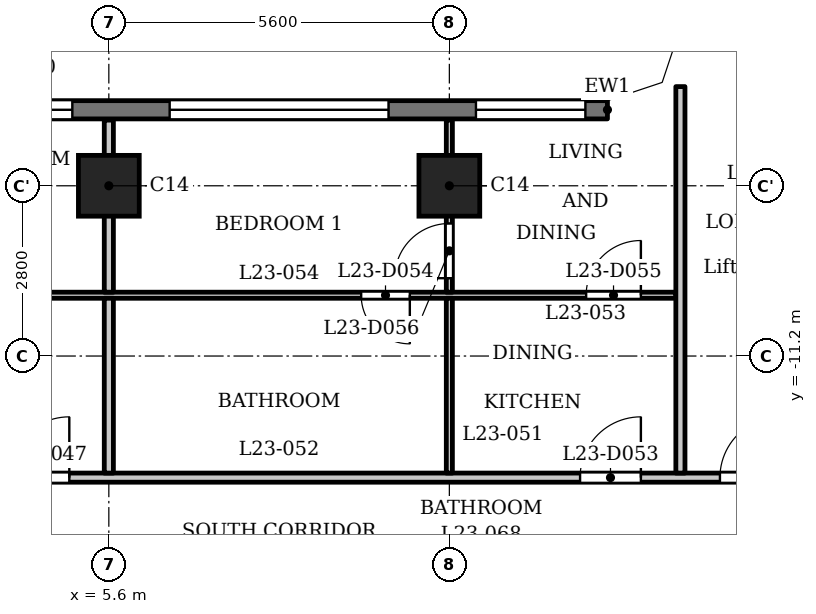
"""IFC4 building model, lengths in metres.
Left out: names, types, materials, properties, quantities, classifications, styles, units other than length and angle.
Written with IfcOpenShell. Run it as: python <this file> out.ifc"""

import sys

from ifc_helpers import new_model, si_unit, direction, frame, frame_2d, origin, origin_2d, place, context, subcontext, project, spatial, polyline, rectangle, outline, extrude, element, fill, save


model = new_model("IFC4")
c1 = context("Model", 3, precision=1e-05, world=origin(), true_north=direction((0.0, 1.0)))
c2 = subcontext(c1, "Body", "Model", "MODEL_VIEW")
j1 = project(units=[si_unit("LENGTHUNIT", "METRE"), si_unit("PLANEANGLEUNIT", "RADIAN")], contexts=[c1])
p1 = place(None, origin())
s1 = spatial("IfcSite", under=j1, at=p1, CompositionType="ELEMENT")
p2 = place(p1, origin())
s2 = spatial("IfcBuilding", under=s1, at=p2, CompositionType="ELEMENT")
p3 = place(p2, frame((0.0, 0.0, 93.8)))
s3 = spatial("IfcBuildingStorey", under=s2, at=p3, CompositionType="ELEMENT", Elevation=93.8)
for number, where, z_axis, x_axis in (
    (1, (5.6, -8.4, 0.0), (0.0, 0.0, 1.0), (1.0, 0.0, 0.0)),
    (2, (11.2, -8.4, 0.0), (0.0, 0.0, 1.0), (1.0, 0.0, 0.0)),
):
    element("IfcColumn", number, at=place(p3, frame(where, z_axis=z_axis, x_axis=x_axis)), inside=s3, PredefinedType="COLUMN", context=c2, shape_type="SweptSolid", body=[
        extrude(rectangle(XDim=1.0, YDim=1.0, at=origin_2d()), origin(), (0.0, 0.0, 1.0), 3.5),
    ])
p4 = place(p3, frame((13.8, -7.15, 0.0), z_axis=(0.0, 0.0, 1.0), x_axis=(-1.0, 0.0, 0.0)))
e3 = element("IfcWall", 3, at=p4, inside=s3, PredefinedType="SOLIDWALL", context=c2, shape_type="SweptSolid", body=[
    extrude(rectangle(XDim=27.6, YDim=0.3, at=frame_2d((13.8, 0.0))), origin(), (0.0, 0.0, 1.0), 3.2),
])
p5 = place(p4, frame((0.363, 0.0, 0.9)))
e4 = element("IfcOpeningElement", 4, at=p5, cuts=e3, PredefinedType="OPENING", context=c2, shape_type="SweptSolid", body=[
    extrude(rectangle(XDim=1.8, YDim=1.25, at=frame_2d((0.9, 0.625))), frame((0.0, 0.16, 0.0), z_axis=(0.0, -1.0, 0.0), x_axis=(1.0, 0.0, 0.0)), (0.0, 0.0, 1.0), 0.32),
])
p6 = place(p4, frame((3.6, 0.0, 1.2)))
e5 = element("IfcOpeningElement", 5, at=p6, cuts=e3, PredefinedType="OPENING", context=c2, shape_type="SweptSolid", body=[
    extrude(rectangle(XDim=3.6, YDim=0.95, at=frame_2d((1.8, 0.475))), frame((0.0, 0.16, 0.0), z_axis=(0.0, -1.0, 0.0), x_axis=(1.0, 0.0, 0.0)), (0.0, 0.0, 1.0), 0.32),
])
p7 = place(p4, frame((8.8, 0.0, 0.9)))
e6 = element("IfcOpeningElement", 6, at=p7, cuts=e3, PredefinedType="OPENING", context=c2, shape_type="SweptSolid", body=[
    extrude(rectangle(XDim=1.8, YDim=1.25, at=frame_2d((0.9, 0.625))), frame((0.0, 0.16, 0.0), z_axis=(0.0, -1.0, 0.0), x_axis=(1.0, 0.0, 0.0)), (0.0, 0.0, 1.0), 0.32),
])
p8 = place(p4, frame((11.6, 0.0, 0.9)))
e7 = element("IfcOpeningElement", 7, at=p8, cuts=e3, PredefinedType="OPENING", context=c2, shape_type="SweptSolid", body=[
    extrude(rectangle(XDim=1.8, YDim=1.25, at=frame_2d((0.9, 0.625))), frame((0.0, 0.16, 0.0), z_axis=(0.0, -1.0, 0.0), x_axis=(1.0, 0.0, 0.0)), (0.0, 0.0, 1.0), 0.32),
])
p9 = place(p4, frame((14.8, 0.0, 1.2)))
e8 = element("IfcOpeningElement", 8, at=p9, cuts=e3, PredefinedType="OPENING", context=c2, shape_type="SweptSolid", body=[
    extrude(rectangle(XDim=3.6, YDim=0.95, at=frame_2d((1.8, 0.475))), frame((0.0, 0.16, 0.0), z_axis=(0.0, -1.0, 0.0), x_axis=(1.0, 0.0, 0.0)), (0.0, 0.0, 1.0), 0.32),
])
p10 = place(p4, frame((20.4, 0.0, 1.2)))
e9 = element("IfcOpeningElement", 9, at=p10, cuts=e3, PredefinedType="OPENING", context=c2, shape_type="SweptSolid", body=[
    extrude(rectangle(XDim=3.6, YDim=0.95, at=frame_2d((1.8, 0.475))), frame((0.0, 0.16, 0.0), z_axis=(0.0, -1.0, 0.0), x_axis=(1.0, 0.0, 0.0)), (0.0, 0.0, 1.0), 0.32),
])
p11 = place(p4, frame((25.438, 0.0, 0.9)))
e10 = element("IfcOpeningElement", 10, at=p11, cuts=e3, PredefinedType="OPENING", context=c2, shape_type="SweptSolid", body=[
    extrude(rectangle(XDim=1.8, YDim=1.25, at=frame_2d((0.9, 0.625))), frame((0.0, 0.16, 0.0), z_axis=(0.0, -1.0, 0.0), x_axis=(1.0, 0.0, 0.0)), (0.0, 0.0, 1.0), 0.32),
])
p12 = place(p3, frame((-17.4, -13.2, 0.0), z_axis=(0.0, 0.0, 1.0), x_axis=(1.0, 0.0, 0.0)))
e11 = element("IfcWall", 11, at=p12, inside=s3, PredefinedType="PARTITIONING", context=c2, shape_type="SweptSolid", body=[
    extrude(rectangle(XDim=34.8, YDim=0.15, at=frame_2d((17.4, 0.0))), origin(), (0.0, 0.0, 1.0), 3.2),
])
p13 = place(p12, frame((0.65, 0.0, 0.0)))
e12 = element("IfcOpeningElement", 12, at=p13, cuts=e11, PredefinedType="OPENING", context=c2, shape_type="SweptSolid", body=[
    extrude(rectangle(XDim=1.0, YDim=2.1, at=frame_2d((0.5, 1.05))), frame((0.0, 0.085, 0.0), z_axis=(0.0, -1.0, 0.0), x_axis=(1.0, 0.0, 0.0)), (0.0, 0.0, 1.0), 0.17),
])
p14 = place(p12, frame((33.05, 0.0, 0.0)))
e13 = element("IfcOpeningElement", 13, at=p14, cuts=e11, PredefinedType="OPENING", context=c2, shape_type="SweptSolid", body=[
    extrude(rectangle(XDim=1.0, YDim=2.1, at=frame_2d((0.5, 1.05))), frame((0.0, 0.085, 0.0), z_axis=(0.0, -1.0, 0.0), x_axis=(1.0, 0.0, 0.0)), (0.0, 0.0, 1.0), 0.17),
])
p15 = place(p12, frame((4.55, 0.0, 0.0)))
e14 = element("IfcOpeningElement", 14, at=p15, cuts=e11, PredefinedType="OPENING", context=c2, shape_type="SweptSolid", body=[
    extrude(rectangle(XDim=1.0, YDim=2.1, at=frame_2d((0.5, 1.05))), frame((0.0, 0.085, 0.0), z_axis=(0.0, -1.0, 0.0), x_axis=(1.0, 0.0, 0.0)), (0.0, 0.0, 1.0), 0.17),
])
p16 = place(p12, frame((21.35, 0.0, 0.0)))
e15 = element("IfcOpeningElement", 15, at=p16, cuts=e11, PredefinedType="OPENING", context=c2, shape_type="SweptSolid", body=[
    extrude(rectangle(XDim=1.0, YDim=2.1, at=frame_2d((0.5, 1.05))), frame((0.0, 0.085, 0.0), z_axis=(0.0, -1.0, 0.0), x_axis=(1.0, 0.0, 0.0)), (0.0, 0.0, 1.0), 0.17),
])
p17 = place(p12, frame((30.75, 0.0, 0.0)))
e16 = element("IfcOpeningElement", 16, at=p17, cuts=e11, PredefinedType="OPENING", context=c2, shape_type="SweptSolid", body=[
    extrude(rectangle(XDim=1.0, YDim=2.1, at=frame_2d((0.5, 1.05))), frame((0.0, 0.085, 0.0), z_axis=(0.0, -1.0, 0.0), x_axis=(1.0, 0.0, 0.0)), (0.0, 0.0, 1.0), 0.17),
])
p18 = place(p3, frame((-14.925, -10.2, 0.0), z_axis=(0.0, 0.0, 1.0), x_axis=(1.0, 0.0, 0.0)))
e17 = element("IfcWall", 17, at=p18, inside=s3, PredefinedType="PARTITIONING", context=c2, shape_type="SweptSolid", body=[
    extrude(rectangle(XDim=29.85, YDim=0.1, at=frame_2d((14.925, 0.0))), origin(), (0.0, 0.0, 1.0), 3.2),
])
p19 = place(p18, frame((7.875, 0.0, 0.0)))
e18 = element("IfcOpeningElement", 18, at=p19, cuts=e17, PredefinedType="OPENING", context=c2, shape_type="SweptSolid", body=[
    extrude(rectangle(XDim=0.8, YDim=2.1, at=frame_2d((0.4, 1.05))), frame((0.0, 0.06, 0.0), z_axis=(0.0, -1.0, 0.0), x_axis=(1.0, 0.0, 0.0)), (0.0, 0.0, 1.0), 0.12),
])
p20 = place(p18, frame((2.175, 0.0, 0.0)))
e19 = element("IfcOpeningElement", 19, at=p20, cuts=e17, PredefinedType="OPENING", context=c2, shape_type="SweptSolid", body=[
    extrude(rectangle(XDim=0.9, YDim=2.1, at=frame_2d((0.45, 1.05))), frame((0.0, 0.06, 0.0), z_axis=(0.0, -1.0, 0.0), x_axis=(1.0, 0.0, 0.0)), (0.0, 0.0, 1.0), 0.12),
])
p21 = place(p18, frame((9.975, 0.0, 0.0)))
e20 = element("IfcOpeningElement", 20, at=p21, cuts=e17, PredefinedType="OPENING", context=c2, shape_type="SweptSolid", body=[
    extrude(rectangle(XDim=0.8, YDim=2.1, at=frame_2d((0.4, 1.05))), frame((0.0, 0.06, 0.0), z_axis=(0.0, -1.0, 0.0), x_axis=(1.0, 0.0, 0.0)), (0.0, 0.0, 1.0), 0.12),
])
p22 = place(p18, frame((12.125, 0.0, 0.0)))
e21 = element("IfcOpeningElement", 21, at=p22, cuts=e17, PredefinedType="OPENING", context=c2, shape_type="SweptSolid", body=[
    extrude(rectangle(XDim=0.9, YDim=2.1, at=frame_2d((0.45, 1.05))), frame((0.0, 0.06, 0.0), z_axis=(0.0, -1.0, 0.0), x_axis=(1.0, 0.0, 0.0)), (0.0, 0.0, 1.0), 0.12),
])
p23 = place(p18, frame((15.975, 0.0, 0.0)))
e22 = element("IfcOpeningElement", 22, at=p23, cuts=e17, PredefinedType="OPENING", context=c2, shape_type="SweptSolid", body=[
    extrude(rectangle(XDim=0.9, YDim=2.1, at=frame_2d((0.45, 1.05))), frame((0.0, 0.06, 0.0), z_axis=(0.0, -1.0, 0.0), x_axis=(1.0, 0.0, 0.0)), (0.0, 0.0, 1.0), 0.12),
])
p24 = place(p18, frame((18.225, 0.0, 0.0)))
e23 = element("IfcOpeningElement", 23, at=p24, cuts=e17, PredefinedType="OPENING", context=c2, shape_type="SweptSolid", body=[
    extrude(rectangle(XDim=0.9, YDim=2.1, at=frame_2d((0.45, 1.05))), frame((0.0, 0.06, 0.0), z_axis=(0.0, -1.0, 0.0), x_axis=(1.0, 0.0, 0.0)), (0.0, 0.0, 1.0), 0.12),
])
p25 = place(p18, frame((24.675, 0.0, 0.0)))
e24 = element("IfcOpeningElement", 24, at=p25, cuts=e17, PredefinedType="OPENING", context=c2, shape_type="SweptSolid", body=[
    extrude(rectangle(XDim=0.8, YDim=2.1, at=frame_2d((0.4, 1.05))), frame((0.0, 0.06, 0.0), z_axis=(0.0, -1.0, 0.0), x_axis=(1.0, 0.0, 0.0)), (0.0, 0.0, 1.0), 0.12),
])
p26 = place(p18, frame((28.375, 0.0, 0.0)))
e25 = element("IfcOpeningElement", 25, at=p26, cuts=e17, PredefinedType="OPENING", context=c2, shape_type="SweptSolid", body=[
    extrude(rectangle(XDim=0.9, YDim=2.1, at=frame_2d((0.45, 1.05))), frame((0.0, 0.06, 0.0), z_axis=(0.0, -1.0, 0.0), x_axis=(1.0, 0.0, 0.0)), (0.0, 0.0, 1.0), 0.12),
])
p27 = place(p3, frame((5.6, -13.125, 0.0), z_axis=(0.0, 0.0, 1.0), x_axis=(0.0, 1.0, 0.0)))
e26 = element("IfcWall", 26, at=p27, inside=s3, PredefinedType="PARTITIONING", context=c2, shape_type="SweptSolid", body=[
    extrude(rectangle(XDim=2.875, YDim=0.15, at=frame_2d((1.438, 0.0))), origin(), (0.0, 0.0, 1.0), 3.2),
])
p28 = place(p3, frame((5.6, -10.15, 0.0), z_axis=(0.0, 0.0, 1.0), x_axis=(0.0, 1.0, 0.0)))
e27 = element("IfcWall", 27, at=p28, inside=s3, PredefinedType="PARTITIONING", context=c2, shape_type="SweptSolid", body=[
    extrude(rectangle(XDim=2.83, YDim=0.15, at=frame_2d((1.415, 0.0))), origin(), (0.0, 0.0, 1.0), 3.2),
])
p29 = place(p3, frame((11.2, -13.125, 0.0), z_axis=(0.0, 0.0, 1.0), x_axis=(0.0, 1.0, 0.0)))
e28 = element("IfcWall", 28, at=p29, inside=s3, PredefinedType="PARTITIONING", context=c2, shape_type="SweptSolid", body=[
    extrude(rectangle(XDim=2.875, YDim=0.1, at=frame_2d((1.438, 0.0))), origin(), (0.0, 0.0, 1.0), 3.2),
])
p30 = place(p3, frame((11.2, -10.15, 0.0), z_axis=(0.0, 0.0, 1.0), x_axis=(0.0, 1.0, 0.0)))
e29 = element("IfcWall", 29, at=p30, inside=s3, PredefinedType="PARTITIONING", context=c2, shape_type="SweptSolid", body=[
    extrude(rectangle(XDim=2.83, YDim=0.1, at=frame_2d((1.415, 0.0))), origin(), (0.0, 0.0, 1.0), 3.2),
])
p31 = place(p30, frame((0.23, 0.0, 0.0)))
e30 = element("IfcOpeningElement", 30, at=p31, cuts=e29, PredefinedType="OPENING", context=c2, shape_type="SweptSolid", body=[
    extrude(rectangle(XDim=0.9, YDim=2.1, at=frame_2d((0.45, 1.05))), frame((0.0, 0.06, 0.0), z_axis=(0.0, -1.0, 0.0), x_axis=(1.0, 0.0, 0.0)), (0.0, 0.0, 1.0), 0.12),
])
p32 = place(p3, frame((15.0, -13.125, 0.0), z_axis=(0.0, 0.0, 1.0), x_axis=(0.0, 1.0, 0.0)))
e31 = element("IfcWall", 31, at=p32, inside=s3, PredefinedType="PARTITIONING", context=c2, shape_type="SweptSolid", body=[
    extrude(rectangle(XDim=6.356, YDim=0.15, at=frame_2d((3.178, 0.0))), origin(), (0.0, 0.0, 1.0), 3.2),
])
p33 = place(p3, origin())
e32 = element("IfcWall", 32, at=p33, inside=s3, PredefinedType="SOLIDWALL", context=c2, shape_type="SweptSolid", body=[
    extrude(outline(polyline([(14.937, -6.937), (15.3, -5.849), (15.3, -5.8), (15.0, -5.8), (14.7, -6.7), (13.8, -7.0), (13.8, -7.3), (13.849, -7.3), (14.937, -6.937)])), origin(), (0.0, 0.0, 1.0), 3.2),
])
p34 = place(p14, origin())
e33 = element("IfcDoor", 33, at=p34, inside=s3, OperationType="SINGLE_SWING_LEFT", PredefinedType="DOOR", context=c2, shape_type="SweptSolid", body=[
    extrude(rectangle(XDim=1.0, YDim=2.1, at=frame_2d((0.5, 1.05))), frame((0.0, 0.025, 0.0), z_axis=(0.0, -1.0, 0.0), x_axis=(1.0, 0.0, 0.0)), (0.0, 0.0, 1.0), 0.05),
])
fill(e13, e33)
p35 = place(p16, origin())
e34 = element("IfcDoor", 34, at=p35, inside=s3, OperationType="SINGLE_SWING_LEFT", PredefinedType="DOOR", context=c2, shape_type="SweptSolid", body=[
    extrude(rectangle(XDim=1.0, YDim=2.1, at=frame_2d((0.5, 1.05))), frame((0.0, 0.025, 0.0), z_axis=(0.0, -1.0, 0.0), x_axis=(1.0, 0.0, 0.0)), (0.0, 0.0, 1.0), 0.05),
])
fill(e15, e34)
p36 = place(p17, origin())
e35 = element("IfcDoor", 35, at=p36, inside=s3, OperationType="SINGLE_SWING_LEFT", PredefinedType="DOOR", context=c2, shape_type="SweptSolid", body=[
    extrude(rectangle(XDim=1.0, YDim=2.1, at=frame_2d((0.5, 1.05))), frame((0.0, 0.025, 0.0), z_axis=(0.0, -1.0, 0.0), x_axis=(1.0, 0.0, 0.0)), (0.0, 0.0, 1.0), 0.05),
])
fill(e16, e35)
p37 = place(p25, origin())
e36 = element("IfcDoor", 36, at=p37, inside=s3, OperationType="SINGLE_SWING_RIGHT", PredefinedType="DOOR", context=c2, shape_type="SweptSolid", body=[
    extrude(rectangle(XDim=0.8, YDim=2.1, at=frame_2d((0.4, 1.05))), frame((0.0, 0.025, 0.0), z_axis=(0.0, -1.0, 0.0), x_axis=(1.0, 0.0, 0.0)), (0.0, 0.0, 1.0), 0.05),
])
fill(e24, e36)
p38 = place(p26, origin())
e37 = element("IfcDoor", 37, at=p38, inside=s3, OperationType="SINGLE_SWING_LEFT", PredefinedType="DOOR", context=c2, shape_type="SweptSolid", body=[
    extrude(rectangle(XDim=0.9, YDim=2.1, at=frame_2d((0.45, 1.05))), frame((0.0, 0.025, 0.0), z_axis=(0.0, -1.0, 0.0), x_axis=(1.0, 0.0, 0.0)), (0.0, 0.0, 1.0), 0.05),
])
fill(e25, e37)
p39 = place(p31, origin())
e38 = element("IfcDoor", 38, at=p39, inside=s3, OperationType="SINGLE_SWING_RIGHT", PredefinedType="DOOR", context=c2, shape_type="SweptSolid", body=[
    extrude(rectangle(XDim=0.9, YDim=2.1, at=frame_2d((0.45, 1.05))), frame((0.0, 0.025, 0.0), z_axis=(0.0, -1.0, 0.0), x_axis=(1.0, 0.0, 0.0)), (0.0, 0.0, 1.0), 0.05),
])
fill(e30, e38)
p40 = place(p5, origin())
e39 = element("IfcWindow", 39, at=p40, inside=s3, PartitioningType="SINGLE_PANEL", PredefinedType="WINDOW", context=c2, shape_type="SweptSolid", body=[
    extrude(rectangle(XDim=1.8, YDim=1.25, at=frame_2d((0.9, 0.625))), frame((0.0, 0.03, 0.0), z_axis=(0.0, -1.0, 0.0), x_axis=(1.0, 0.0, 0.0)), (0.0, 0.0, 1.0), 0.06),
])
fill(e4, e39)
p41 = place(p6, origin())
e40 = element("IfcWindow", 40, at=p41, inside=s3, PartitioningType="SINGLE_PANEL", PredefinedType="WINDOW", context=c2, shape_type="SweptSolid", body=[
    extrude(rectangle(XDim=3.6, YDim=0.95, at=frame_2d((1.8, 0.475))), frame((0.0, 0.03, 0.0), z_axis=(0.0, -1.0, 0.0), x_axis=(1.0, 0.0, 0.0)), (0.0, 0.0, 1.0), 0.06),
])
fill(e5, e40)
p42 = place(p7, origin())
e41 = element("IfcWindow", 41, at=p42, inside=s3, PartitioningType="SINGLE_PANEL", PredefinedType="WINDOW", context=c2, shape_type="SweptSolid", body=[
    extrude(rectangle(XDim=1.8, YDim=1.25, at=frame_2d((0.9, 0.625))), frame((0.0, 0.03, 0.0), z_axis=(0.0, -1.0, 0.0), x_axis=(1.0, 0.0, 0.0)), (0.0, 0.0, 1.0), 0.06),
])
fill(e6, e41)
save(model, sys.argv[1])
